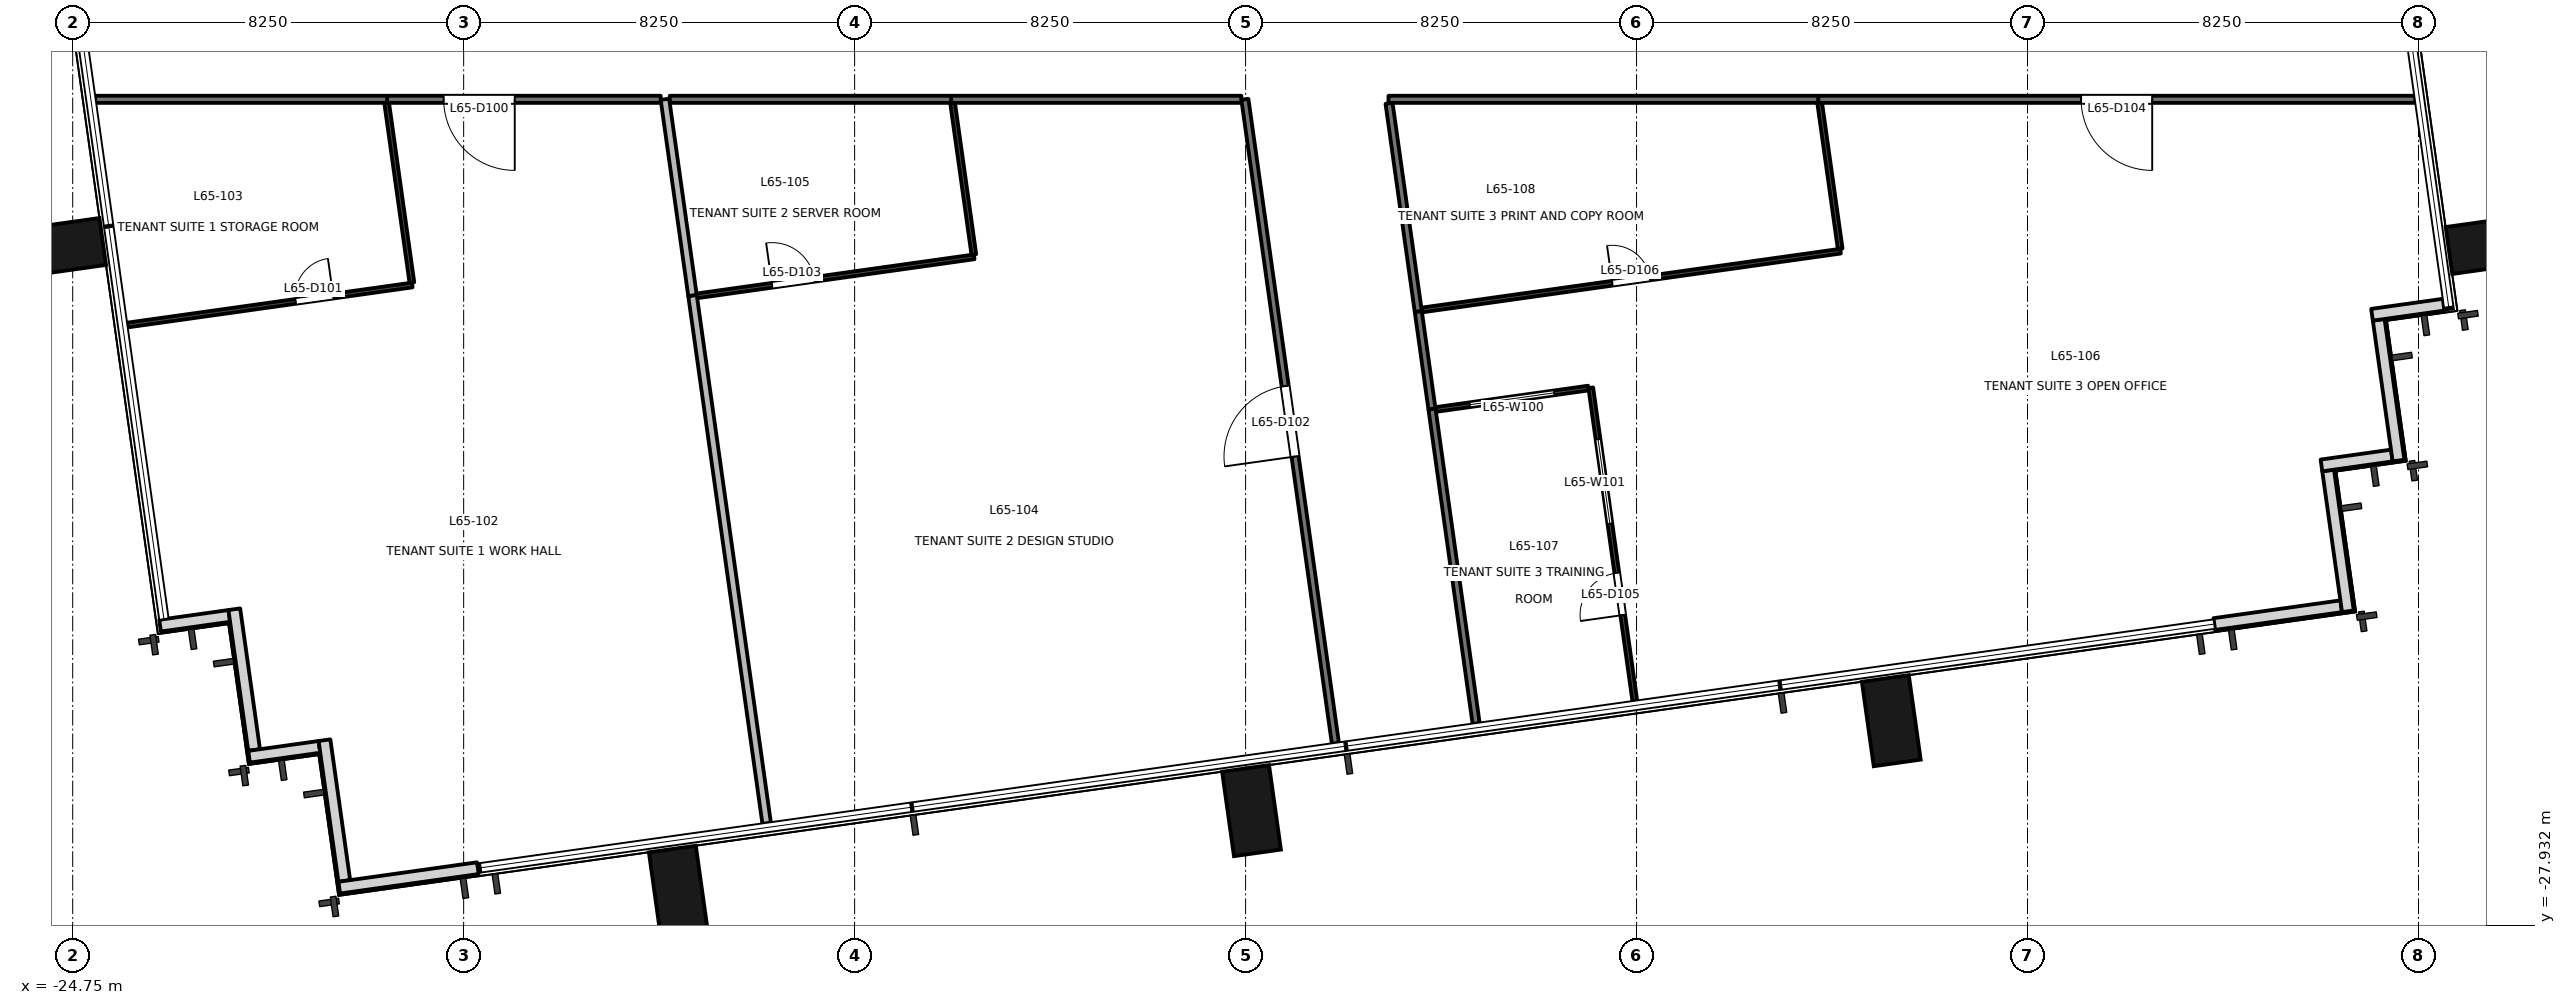
"""IFC4 building model, lengths in metres.
Left out: names, types, materials, properties, quantities, classifications, styles, units other than length and angle.
Written with IfcOpenShell. Run it as: python <this file> out.ifc"""

import sys

from ifc_helpers import new_model, si_unit, direction, frame, frame_2d, origin, origin_2d, place, context, subcontext, project, spatial, rectangle, extrude, element, fill, save


model = new_model("IFC4")
c1 = context("Model", 3, precision=1e-05, world=origin(), true_north=direction((0.0, 1.0)))
c2 = subcontext(c1, "Body", "Model", "MODEL_VIEW")
j1 = project(units=[si_unit("LENGTHUNIT", "METRE"), si_unit("PLANEANGLEUNIT", "RADIAN")], contexts=[c1])
p1 = place(None, origin())
s1 = spatial("IfcSite", under=j1, at=p1, CompositionType="ELEMENT")
p2 = place(p1, origin())
s2 = spatial("IfcBuilding", under=s1, at=p2, CompositionType="ELEMENT")
p3 = place(p2, frame((0.0, 0.0, 282.4)))
s3 = spatial("IfcBuildingStorey", under=s2, at=p3, CompositionType="ELEMENT", Elevation=282.4)
for number, where, z_axis, x_axis in (
    (1, (-11.971, -27.209, -0.2), (0.0, 0.0, 1.0), (0.99, 0.139, 0.0)),
    (2, (0.125, -25.508, -0.2), (0.0, 0.0, 1.0), (0.99, 0.139, 0.0)),
    (3, (13.625, -23.61, -0.2), (0.0, 0.0, 1.0), (0.99, 0.139, 0.0)),
    (4, (-25.007, -13.625, -0.2), (0.0, 0.0, 1.0), (-0.139, 0.99, 0.0)),
    (5, (26.284, -13.565, -0.2), (0.0, 0.0, 1.0), (-0.139, 0.99, 0.0)),
):
    element("IfcColumn", number, at=place(p3, frame(where, z_axis=z_axis, x_axis=x_axis)), inside=s3, PredefinedType="COLUMN", context=c2, shape_type="SweptSolid", body=[
        extrude(rectangle(XDim=1.0, YDim=1.8, at=origin_2d()), origin(), (0.0, 0.0, 1.0), 3.9),
    ])
p4 = place(p3, frame((20.44, -21.572, 0.0), z_axis=(0.0, 0.0, 1.0), x_axis=(0.990293105353, 0.138994839796, 0.0)))
e6 = element("IfcWall", 6, at=p4, inside=s3, PredefinedType="SOLIDWALL", context=c2, shape_type="SweptSolid", body=[
    extrude(rectangle(XDim=2.705, YDim=0.25, at=frame_2d((1.353, 0.0))), origin(), (0.0, 0.0, 1.0), 3.7),
])
p5 = place(p3, frame((23.26, -21.302, 0.0), z_axis=(0.0, 0.0, 1.0), x_axis=(-0.138994228812, 0.990293191109, 0.0)))
e7 = element("IfcWall", 7, at=p5, inside=s3, PredefinedType="SOLIDWALL", context=c2, shape_type="SweptSolid", body=[
    extrude(rectangle(XDim=3.0, YDim=0.25, at=frame_2d((1.5, 0.0))), origin(), (0.0, 0.0, 1.0), 3.7),
])
p6 = place(p3, frame((22.702, -18.225, 0.0), z_axis=(0.0, 0.0, 1.0), x_axis=(0.990243596651, 0.13934711799, 0.0)))
e8 = element("IfcWall", 8, at=p6, inside=s3, PredefinedType="SOLIDWALL", context=c2, shape_type="SweptSolid", body=[
    extrude(rectangle(XDim=1.5, YDim=0.25, at=frame_2d((0.75, 0.0))), origin(), (0.0, 0.0, 1.0), 3.7),
])
p7 = place(p3, frame((24.328, -18.122, 0.0), z_axis=(0.0, 0.0, 1.0), x_axis=(-0.139358350296, 0.990242015975, 0.0)))
e9 = element("IfcWall", 9, at=p7, inside=s3, PredefinedType="SOLIDWALL", context=c2, shape_type="SweptSolid", body=[
    extrude(rectangle(XDim=2.999, YDim=0.25, at=frame_2d((1.5, 0.0))), origin(), (0.0, 0.0, 1.0), 3.7),
])
p8 = place(p3, frame((23.769, -15.046, 0.0), z_axis=(0.0, 0.0, 1.0), x_axis=(0.990260716096, 0.139225407725, 0.0)))
e10 = element("IfcWall", 10, at=p8, inside=s3, PredefinedType="SOLIDWALL", context=c2, shape_type="SweptSolid", body=[
    extrude(rectangle(XDim=1.526, YDim=0.25, at=frame_2d((0.763, 0.0))), origin(), (0.0, 0.0, 1.0), 3.7),
])
p9 = place(p3, frame((-22.906, -21.605, 0.0), z_axis=(0.0, 0.0, 1.0), x_axis=(0.990235520307, 0.13940449893, 0.0)))
e11 = element("IfcWall", 11, at=p9, inside=s3, PredefinedType="SOLIDWALL", context=c2, shape_type="SweptSolid", body=[
    extrude(rectangle(XDim=1.475, YDim=0.25, at=frame_2d((0.737, 0.0))), origin(), (0.0, 0.0, 1.0), 3.7),
])
p10 = place(p3, frame((-21.34, -21.258, 0.0), z_axis=(0.0, 0.0, 1.0), x_axis=(0.139393225799, -0.990237107263, 0.0)))
e12 = element("IfcWall", 12, at=p10, inside=s3, PredefinedType="SOLIDWALL", context=c2, shape_type="SweptSolid", body=[
    extrude(rectangle(XDim=3.0, YDim=0.25, at=frame_2d((1.5, 0.0))), origin(), (0.0, 0.0, 1.0), 3.7),
])
p11 = place(p3, frame((-21.028, -24.37, 0.0), z_axis=(0.0, 0.0, 1.0), x_axis=(0.990330117064, 0.138730887823, 0.0)))
e13 = element("IfcWall", 13, at=p11, inside=s3, PredefinedType="SOLIDWALL", context=c2, shape_type="SweptSolid", body=[
    extrude(rectangle(XDim=1.499, YDim=0.25, at=frame_2d((0.75, 0.0))), origin(), (0.0, 0.0, 1.0), 3.7),
])
p12 = place(p3, frame((-19.437, -24.021, 0.0), z_axis=(0.0, 0.0, 1.0), x_axis=(0.139358350296, -0.990242015975, 0.0)))
e14 = element("IfcWall", 14, at=p12, inside=s3, PredefinedType="SOLIDWALL", context=c2, shape_type="SweptSolid", body=[
    extrude(rectangle(XDim=2.999, YDim=0.25, at=frame_2d((1.5, 0.0))), origin(), (0.0, 0.0, 1.0), 3.7),
])
p13 = place(p3, frame((-19.125, -27.132, 0.0), z_axis=(0.0, 0.0, 1.0), x_axis=(0.990291981483, 0.139002846771, 0.0)))
e15 = element("IfcWall", 15, at=p13, inside=s3, PredefinedType="SOLIDWALL", context=c2, shape_type="SweptSolid", body=[
    extrude(rectangle(XDim=2.954, YDim=0.25, at=frame_2d((1.477, 0.0))), origin(), (0.0, 0.0, 1.0), 3.7),
])
p14 = place(p3, frame((-12.342, -10.5, 0.0), z_axis=(0.0, 0.0, 1.0), x_axis=(-1.0, 0.0, 0.0)))
e16 = element("IfcWall", 16, at=p14, inside=s3, PredefinedType="PARTITIONING", context=c2, shape_type="SweptSolid", body=[
    extrude(rectangle(XDim=5.774, YDim=0.15, at=frame_2d((2.887, 0.0))), origin(), (0.0, 0.0, 1.0), 2.8),
])
p15 = place(p14, frame((3.08, 0.0, 0.0)))
e17 = element("IfcOpeningElement", 17, at=p15, cuts=e16, PredefinedType="OPENING", context=c2, shape_type="SweptSolid", body=[
    extrude(rectangle(XDim=1.5, YDim=2.1, at=frame_2d((0.75, 1.05))), frame((0.0, 0.085, 0.0), z_axis=(0.0, -1.0, 0.0), x_axis=(1.0, 0.0, 0.0)), (0.0, 0.0, 1.0), 0.171),
])
p16 = place(p3, frame((-18.116, -10.5, 0.0), z_axis=(0.0, 0.0, 1.0), x_axis=(-1.0, 0.0, 0.0)))
e18 = element("IfcWall", 18, at=p16, inside=s3, PredefinedType="PARTITIONING", context=c2, shape_type="SweptSolid", body=[
    extrude(rectangle(XDim=6.159, YDim=0.15, at=frame_2d((3.08, 0.0))), origin(), (0.0, 0.0, 1.0), 3.7),
])
p17 = place(p3, frame((-0.089, -10.5, 0.0), z_axis=(0.0, 0.0, 1.0), x_axis=(-1.0, 0.0, 0.0)))
e19 = element("IfcWall", 19, at=p17, inside=s3, PredefinedType="PARTITIONING", context=c2, shape_type="SweptSolid", body=[
    extrude(rectangle(XDim=6.125, YDim=0.15, at=frame_2d((3.062, 0.0))), origin(), (0.0, 0.0, 1.0), 2.8),
])
p18 = place(p3, frame((1.895, -24.088, 0.0), z_axis=(0.0, 0.0, 1.0), x_axis=(-0.139191583649, 0.990265470993, 0.0)))
e20 = element("IfcWall", 20, at=p18, inside=s3, PredefinedType="PARTITIONING", context=c2, shape_type="SweptSolid", body=[
    extrude(rectangle(XDim=13.721, YDim=0.15, at=frame_2d((6.861, 0.0))), origin(), (0.0, 0.0, 1.0), 2.9),
])
p19 = place(p18, frame((6.111, 0.0, 0.0)))
e21 = element("IfcOpeningElement", 21, at=p19, cuts=e20, PredefinedType="OPENING", context=c2, shape_type="SweptSolid", body=[
    extrude(rectangle(XDim=1.5, YDim=2.1, at=frame_2d((0.75, 1.05))), frame((0.0, 0.085, 0.0), z_axis=(0.0, -1.0, 0.0), x_axis=(1.0, 0.0, 0.0)), (0.0, 0.0, 1.0), 0.171),
])
p20 = place(p3, frame((-6.214, -10.5, 0.0), z_axis=(0.0, 0.0, 1.0), x_axis=(-1.0, 0.0, 0.0)))
e22 = element("IfcWall", 22, at=p20, inside=s3, PredefinedType="PARTITIONING", context=c2, shape_type="SweptSolid", body=[
    extrude(rectangle(XDim=5.937, YDim=0.15, at=frame_2d((2.968, 0.0))), origin(), (0.0, 0.0, 1.0), 2.8),
])
p21 = place(p3, frame((3.644, -14.976, 0.0), z_axis=(0.0, 0.0, 1.0), x_axis=(0.13897247285, -0.990296244459, 0.0)))
e23 = element("IfcWall", 23, at=p21, inside=s3, PredefinedType="PARTITIONING", context=c2, shape_type="SweptSolid", body=[
    extrude(rectangle(XDim=2.08, YDim=0.15, at=frame_2d((1.04, 0.0))), origin(), (0.0, 0.0, 1.0), 3.7),
])
p22 = place(p3, frame((24.68, -10.5, 0.0), z_axis=(0.0, 0.0, 1.0), x_axis=(-1.0, 0.0, 0.0)))
e24 = element("IfcWall", 24, at=p22, inside=s3, PredefinedType="PARTITIONING", context=c2, shape_type="SweptSolid", body=[
    extrude(rectangle(XDim=12.597, YDim=0.15, at=frame_2d((6.298, 0.0))), origin(), (0.0, 0.0, 1.0), 3.0),
])
p23 = place(p22, frame((5.549, 0.0, 0.0)))
e25 = element("IfcOpeningElement", 25, at=p23, cuts=e24, PredefinedType="OPENING", context=c2, shape_type="SweptSolid", body=[
    extrude(rectangle(XDim=1.5, YDim=2.1, at=frame_2d((0.75, 1.05))), frame((0.0, 0.085, 0.0), z_axis=(0.0, -1.0, 0.0), x_axis=(1.0, 0.0, 0.0)), (0.0, 0.0, 1.0), 0.171),
])
p24 = place(p3, frame((3.933, -17.036, 0.0), z_axis=(0.0, 0.0, 1.0), x_axis=(0.13910462383, -0.99027769016, 0.0)))
e26 = element("IfcWall", 26, at=p24, inside=s3, PredefinedType="PARTITIONING", context=c2, shape_type="SweptSolid", body=[
    extrude(rectangle(XDim=6.699, YDim=0.15, at=frame_2d((3.35, 0.0))), origin(), (0.0, 0.0, 1.0), 2.9),
])
p25 = place(p3, frame((3.027, -10.585, 0.0), z_axis=(0.0, 0.0, 1.0), x_axis=(0.139131664816, -0.990273891328, 0.0)))
e27 = element("IfcWall", 27, at=p25, inside=s3, PredefinedType="PARTITIONING", context=c2, shape_type="SweptSolid", body=[
    extrude(rectangle(XDim=4.434, YDim=0.15, at=frame_2d((2.217, 0.0))), origin(), (0.0, 0.0, 1.0), 3.7),
])
p26 = place(p3, frame((12.083, -10.5, 0.0), z_axis=(0.0, 0.0, 1.0), x_axis=(-1.0, 0.0, 0.0)))
e28 = element("IfcWall", 28, at=p26, inside=s3, PredefinedType="PARTITIONING", context=c2, shape_type="SweptSolid", body=[
    extrude(rectangle(XDim=9.068, YDim=0.15, at=frame_2d((4.534, 0.0))), origin(), (0.0, 0.0, 1.0), 2.9),
])
p27 = place(p3, frame((-23.606, -15.264, 0.0), z_axis=(0.0, 0.0, 1.0), x_axis=(0.990273701851, 0.139133013418, 0.0)))
e29 = element("IfcWall", 29, at=p27, inside=s3, PredefinedType="PARTITIONING", context=c2, shape_type="SweptSolid", body=[
    extrude(rectangle(XDim=6.08, YDim=0.1, at=frame_2d((3.04, 0.0))), origin(), (0.0, 0.0, 1.0), 3.7),
])
p28 = place(p27, frame((3.596, 0.0, 0.0)))
e30 = element("IfcOpeningElement", 30, at=p28, cuts=e29, PredefinedType="OPENING", context=c2, shape_type="SweptSolid", body=[
    extrude(rectangle(XDim=0.8, YDim=2.1, at=frame_2d((0.4, 1.05))), frame((0.0, 0.061, 0.0), z_axis=(0.0, -1.0, 0.0), x_axis=(1.0, 0.0, 0.0)), (0.0, 0.0, 1.0), 0.121),
])
p29 = place(p3, frame((-17.592, -14.368, 0.0), z_axis=(0.0, 0.0, 1.0), x_axis=(-0.139149544216, 0.99027137914, 0.0)))
e31 = element("IfcWall", 31, at=p29, inside=s3, PredefinedType="PARTITIONING", context=c2, shape_type="SweptSolid", body=[
    extrude(rectangle(XDim=3.837, YDim=0.1, at=frame_2d((1.918, 0.0))), origin(), (0.0, 0.0, 1.0), 3.7),
])
p30 = place(p3, frame((-11.671, -14.639, 0.0), z_axis=(0.0, 0.0, 1.0), x_axis=(0.139162688284, -0.990269532092, 0.0)))
e32 = element("IfcWall", 32, at=p30, inside=s3, PredefinedType="PARTITIONING", context=c2, shape_type="SweptSolid", body=[
    extrude(rectangle(XDim=11.245, YDim=0.18, at=frame_2d((5.623, 0.0))), origin(), (0.0, 0.0, 1.0), 3.7),
])
p31 = place(p3, frame((-12.253, -10.5, 0.0), z_axis=(0.0, 0.0, 1.0), x_axis=(0.139253936412, -0.990256704695, 0.0)))
e33 = element("IfcWall", 33, at=p31, inside=s3, PredefinedType="PARTITIONING", context=c2, shape_type="SweptSolid", body=[
    extrude(rectangle(XDim=4.18, YDim=0.18, at=frame_2d((2.09, 0.0))), origin(), (0.0, 0.0, 1.0), 3.7),
])
p32 = place(p3, frame((-11.579, -14.647, 0.0), z_axis=(0.0, 0.0, 1.0), x_axis=(0.990255332606, 0.139263693209, 0.0)))
e34 = element("IfcWall", 34, at=p32, inside=s3, PredefinedType="PARTITIONING", context=c2, shape_type="SweptSolid", body=[
    extrude(rectangle(XDim=5.91, YDim=0.1, at=frame_2d((2.955, 0.0))), origin(), (0.0, 0.0, 1.0), 2.8),
])
p33 = place(p32, frame((1.603, 0.0, 0.0)))
e35 = element("IfcOpeningElement", 35, at=p33, cuts=e34, PredefinedType="OPENING", context=c2, shape_type="SweptSolid", body=[
    extrude(rectangle(XDim=0.9, YDim=2.1, at=frame_2d((0.45, 1.05))), frame((0.0, 0.061, 0.0), z_axis=(0.0, -1.0, 0.0), x_axis=(1.0, 0.0, 0.0)), (0.0, 0.0, 1.0), 0.121),
])
p34 = place(p3, frame((-5.734, -13.774, 0.0), z_axis=(0.0, 0.0, 1.0), x_axis=(-0.139066479304, 0.990283047585, 0.0)))
e36 = element("IfcWall", 36, at=p34, inside=s3, PredefinedType="PARTITIONING", context=c2, shape_type="SweptSolid", body=[
    extrude(rectangle(XDim=3.237, YDim=0.1, at=frame_2d((1.619, 0.0))), origin(), (0.0, 0.0, 1.0), 3.7),
])
p35 = place(p3, frame((7.234, -16.592, 0.0), z_axis=(0.0, 0.0, 1.0), x_axis=(-0.990276766322, -0.139111200419, 0.0)))
e37 = element("IfcWall", 37, at=p35, inside=s3, PredefinedType="PARTITIONING", context=c2, shape_type="SweptSolid", body=[
    extrude(rectangle(XDim=3.256, YDim=0.1, at=frame_2d((1.628, 0.0))), origin(), (0.0, 0.0, 1.0), 2.9),
])
p36 = place(p35, frame((0.728, 0.0, 0.9)))
e38 = element("IfcOpeningElement", 38, at=p36, cuts=e37, PredefinedType="OPENING", context=c2, shape_type="SweptSolid", body=[
    extrude(rectangle(XDim=1.8, YDim=1.2, at=frame_2d((0.9, 0.6))), frame((0.0, 0.061, 0.0), z_axis=(0.0, -1.0, 0.0), x_axis=(1.0, 0.0, 0.0)), (0.0, 0.0, 1.0), 0.121),
])
p37 = place(p3, frame((8.214, -23.198, 0.0), z_axis=(0.0, 0.0, 1.0), x_axis=(-0.139286759584, 0.990252088412, 0.0)))
e39 = element("IfcWall", 39, at=p37, inside=s3, PredefinedType="PARTITIONING", context=c2, shape_type="SweptSolid", body=[
    extrude(rectangle(XDim=6.678, YDim=0.1, at=frame_2d((3.339, 0.0))), origin(), (0.0, 0.0, 1.0), 3.7),
])
p38 = place(p37, frame((1.834, 0.0, 0.0)))
e40 = element("IfcOpeningElement", 40, at=p38, cuts=e39, PredefinedType="OPENING", context=c2, shape_type="SweptSolid", body=[
    extrude(rectangle(XDim=0.9, YDim=2.1, at=frame_2d((0.45, 1.05))), frame((0.0, 0.061, 0.0), z_axis=(0.0, -1.0, 0.0), x_axis=(1.0, 0.0, 0.0)), (0.0, 0.0, 1.0), 0.121),
])
p39 = place(p37, frame((3.781, 0.0, 0.9)))
e41 = element("IfcOpeningElement", 41, at=p39, cuts=e39, PredefinedType="OPENING", context=c2, shape_type="SweptSolid", body=[
    extrude(rectangle(XDim=1.8, YDim=1.2, at=frame_2d((0.9, 0.6))), frame((0.0, 0.061, 0.0), z_axis=(0.0, -1.0, 0.0), x_axis=(1.0, 0.0, 0.0)), (0.0, 0.0, 1.0), 0.121),
])
p40 = place(p3, frame((3.715, -14.946, 0.0), z_axis=(0.0, 0.0, 1.0), x_axis=(0.990272367152, 0.139142512753, 0.0)))
e42 = element("IfcWall", 42, at=p40, inside=s3, PredefinedType="PARTITIONING", context=c2, shape_type="SweptSolid", body=[
    extrude(rectangle(XDim=8.926, YDim=0.1, at=frame_2d((4.463, 0.0))), origin(), (0.0, 0.0, 1.0), 2.9),
])
p41 = place(p40, frame((4.063, 0.0, 0.0)))
e43 = element("IfcOpeningElement", 43, at=p41, cuts=e42, PredefinedType="OPENING", context=c2, shape_type="SweptSolid", body=[
    extrude(rectangle(XDim=0.8, YDim=2.1, at=frame_2d((0.4, 1.05))), frame((0.0, 0.061, 0.0), z_axis=(0.0, -1.0, 0.0), x_axis=(1.0, 0.0, 0.0)), (0.0, 0.0, 1.0), 0.121),
])
p42 = place(p3, frame((12.547, -13.654, 0.0), z_axis=(0.0, 0.0, 1.0), x_axis=(-0.139293243016, 0.990251176445, 0.0)))
e44 = element("IfcWall", 44, at=p42, inside=s3, PredefinedType="PARTITIONING", context=c2, shape_type="SweptSolid", body=[
    extrude(rectangle(XDim=3.116, YDim=0.1, at=frame_2d((1.558, 0.0))), origin(), (0.0, 0.0, 1.0), 3.7),
])
p43 = place(p15, origin())
e45 = element("IfcDoor", 45, at=p43, inside=s3, OperationType="DOUBLE_DOOR_SINGLE_SWING", PredefinedType="DOOR", context=c2, shape_type="SweptSolid", body=[
    extrude(rectangle(XDim=1.5, YDim=2.1, at=frame_2d((0.75, 1.05))), frame((0.0, 0.025, 0.0), z_axis=(0.0, -1.0, 0.0), x_axis=(1.0, 0.0, 0.0)), (0.0, 0.0, 1.0), 0.05),
])
fill(e17, e45)
p44 = place(p28, origin())
e46 = element("IfcDoor", 46, at=p44, inside=s3, OperationType="SINGLE_SWING_RIGHT", PredefinedType="DOOR", context=c2, shape_type="SweptSolid", body=[
    extrude(rectangle(XDim=0.8, YDim=2.1, at=frame_2d((0.4, 1.05))), frame((0.0, 0.025, 0.0), z_axis=(0.0, -1.0, 0.0), x_axis=(1.0, 0.0, 0.0)), (0.0, 0.0, 1.0), 0.05),
])
fill(e30, e46)
p45 = place(p19, origin())
e47 = element("IfcDoor", 47, at=p45, inside=s3, OperationType="DOUBLE_DOOR_SINGLE_SWING", PredefinedType="DOOR", context=c2, shape_type="SweptSolid", body=[
    extrude(rectangle(XDim=1.5, YDim=2.1, at=frame_2d((0.75, 1.05))), frame((0.0, 0.025, 0.0), z_axis=(0.0, -1.0, 0.0), x_axis=(1.0, 0.0, 0.0)), (0.0, 0.0, 1.0), 0.05),
])
fill(e21, e47)
p46 = place(p33, origin())
e48 = element("IfcDoor", 48, at=p46, inside=s3, OperationType="SINGLE_SWING_LEFT", PredefinedType="DOOR", context=c2, shape_type="SweptSolid", body=[
    extrude(rectangle(XDim=0.9, YDim=2.1, at=frame_2d((0.45, 1.05))), frame((0.0, 0.025, 0.0), z_axis=(0.0, -1.0, 0.0), x_axis=(1.0, 0.0, 0.0)), (0.0, 0.0, 1.0), 0.05),
])
fill(e35, e48)
p47 = place(p23, origin())
e49 = element("IfcDoor", 49, at=p47, inside=s3, OperationType="DOUBLE_DOOR_SINGLE_SWING", PredefinedType="DOOR", context=c2, shape_type="SweptSolid", body=[
    extrude(rectangle(XDim=1.5, YDim=2.1, at=frame_2d((0.75, 1.05))), frame((0.0, 0.025, 0.0), z_axis=(0.0, -1.0, 0.0), x_axis=(1.0, 0.0, 0.0)), (0.0, 0.0, 1.0), 0.05),
])
fill(e25, e49)
p48 = place(p38, origin())
e50 = element("IfcDoor", 50, at=p48, inside=s3, OperationType="SINGLE_SWING_LEFT", PredefinedType="DOOR", context=c2, shape_type="SweptSolid", body=[
    extrude(rectangle(XDim=0.9, YDim=2.1, at=frame_2d((0.45, 1.05))), frame((0.0, 0.025, 0.0), z_axis=(0.0, -1.0, 0.0), x_axis=(1.0, 0.0, 0.0)), (0.0, 0.0, 1.0), 0.05),
])
fill(e40, e50)
p49 = place(p41, origin())
e51 = element("IfcDoor", 51, at=p49, inside=s3, OperationType="SINGLE_SWING_LEFT", PredefinedType="DOOR", context=c2, shape_type="SweptSolid", body=[
    extrude(rectangle(XDim=0.8, YDim=2.1, at=frame_2d((0.4, 1.05))), frame((0.0, 0.025, 0.0), z_axis=(0.0, -1.0, 0.0), x_axis=(1.0, 0.0, 0.0)), (0.0, 0.0, 1.0), 0.05),
])
fill(e43, e51)
p50 = place(p36, origin())
e52 = element("IfcWindow", 52, at=p50, inside=s3, PartitioningType="SINGLE_PANEL", PredefinedType="WINDOW", context=c2, shape_type="SweptSolid", body=[
    extrude(rectangle(XDim=1.8, YDim=1.2, at=frame_2d((0.9, 0.6))), frame((0.0, 0.03, 0.0), z_axis=(0.0, -1.0, 0.0), x_axis=(1.0, 0.0, 0.0)), (0.0, 0.0, 1.0), 0.06),
])
fill(e38, e52)
p51 = place(p39, origin())
e53 = element("IfcWindow", 53, at=p51, inside=s3, PartitioningType="SINGLE_PANEL", PredefinedType="WINDOW", context=c2, shape_type="SweptSolid", body=[
    extrude(rectangle(XDim=1.8, YDim=1.2, at=frame_2d((0.9, 0.6))), frame((0.0, 0.03, 0.0), z_axis=(0.0, -1.0, 0.0), x_axis=(1.0, 0.0, 0.0)), (0.0, 0.0, 1.0), 0.06),
])
fill(e41, e53)
save(model, sys.argv[1])
